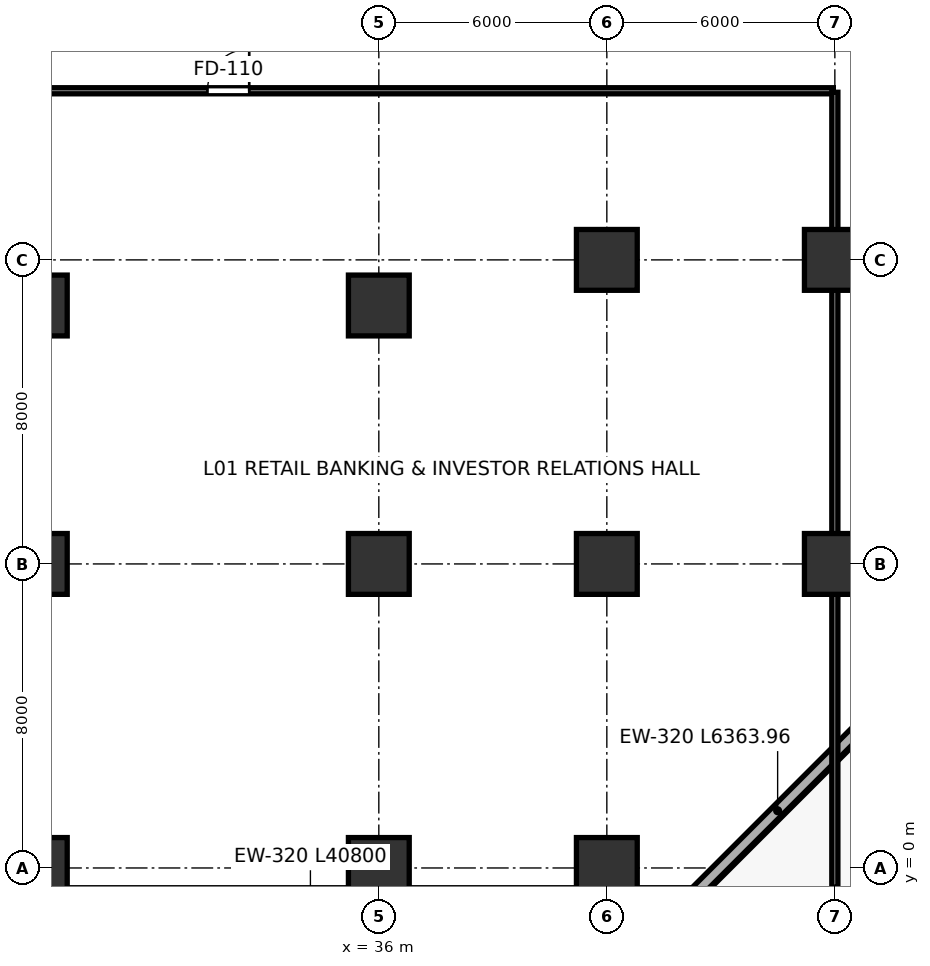
"""IFC4 building model, lengths in metres.
Left out: names, types, materials, properties, quantities, classifications, styles, units other than length and angle.
Written with IfcOpenShell. Run it as: python <this file> out.ifc"""

import sys

from ifc_helpers import new_model, si_unit, direction, frame, frame_2d, origin, origin_2d, place, context, subcontext, project, spatial, rectangle, extrude, source, transform, mapped, element, fill, save


model = new_model("IFC4")
c1 = context("Model", 3, precision=1e-05, world=origin(), true_north=direction((0.0, 1.0)))
c2 = subcontext(c1, "Body", "Model", "MODEL_VIEW")
j1 = project(units=[si_unit("LENGTHUNIT", "METRE"), si_unit("PLANEANGLEUNIT", "RADIAN")], contexts=[c1])
p1 = place(None, origin())
s1 = spatial("IfcSite", under=j1, at=p1, CompositionType="ELEMENT")
p2 = place(p1, origin())
s2 = spatial("IfcBuilding", under=s1, at=p2, CompositionType="ELEMENT")
p3 = place(p2, origin())
s3 = spatial("IfcBuildingStorey", under=s2, at=p3, CompositionType="ELEMENT", Elevation=0.0)
m1 = source(origin(), c2, "Body", "SweptSolid", [
    extrude(rectangle(XDim=1.6, YDim=1.6, at=origin_2d()), origin(), (0.0, 0.0, 1.0), 5.999),
])
p4 = place(p3, frame((27.0, 0.0, 0.001), z_axis=(0.0, 0.0, 1.0), x_axis=(1.0, 0.0, 0.0)))
e1 = element("IfcColumn", 1, at=p4, inside=s3, PredefinedType="COLUMN", context=c2, shape_type="MappedRepresentation", body=[
    mapped(m1, transform((0.0, 0.0, 0.0), scale=1.0)),
])
m2 = source(origin(), c2, "Body", "SweptSolid", [
    extrude(rectangle(XDim=1.6, YDim=1.6, at=origin_2d()), origin(), (0.0, 0.0, 1.0), 5.999),
])
for number, where, z_axis, x_axis in (
    (2, (27.0, 8.0, 0.001), (0.0, 0.0, 1.0), (1.0, 0.0, 0.0)),
    (3, (27.0, 14.8, 0.001), (0.0, 0.0, 1.0), (1.0, 0.0, 0.0)),
):
    element("IfcColumn", number, at=place(p3, frame(where, z_axis=z_axis, x_axis=x_axis)), inside=s3, PredefinedType="COLUMN", context=c2, shape_type="MappedRepresentation", body=[
        mapped(m2, transform((0.0, 0.0, 0.0), scale=1.0)),
    ])
p5 = place(p3, frame((36.0, 0.0, 0.001), z_axis=(0.0, 0.0, 1.0), x_axis=(1.0, 0.0, 0.0)))
e4 = element("IfcColumn", 4, at=p5, inside=s3, PredefinedType="COLUMN", context=c2, shape_type="MappedRepresentation", body=[
    mapped(m1, transform((0.0, 0.0, 0.0), scale=1.0)),
])
for number, where, z_axis, x_axis in (
    (5, (36.0, 8.0, 0.001), (0.0, 0.0, 1.0), (1.0, 0.0, 0.0)),
    (6, (36.0, 14.8, 0.001), (0.0, 0.0, 1.0), (1.0, 0.0, 0.0)),
):
    element("IfcColumn", number, at=place(p3, frame(where, z_axis=z_axis, x_axis=x_axis)), inside=s3, PredefinedType="COLUMN", context=c2, shape_type="MappedRepresentation", body=[
        mapped(m2, transform((0.0, 0.0, 0.0), scale=1.0)),
    ])
p6 = place(p3, frame((42.0, 0.0, 0.001), z_axis=(0.0, 0.0, 1.0), x_axis=(1.0, 0.0, 0.0)))
e7 = element("IfcColumn", 7, at=p6, inside=s3, PredefinedType="COLUMN", context=c2, shape_type="MappedRepresentation", body=[
    mapped(m1, transform((0.0, 0.0, 0.0), scale=1.0)),
])
for number, where, z_axis, x_axis in (
    (8, (42.0, 8.0, 0.001), (0.0, 0.0, 1.0), (1.0, 0.0, 0.0)),
    (9, (42.0, 16.0, 0.001), (0.0, 0.0, 1.0), (1.0, 0.0, 0.0)),
):
    element("IfcColumn", number, at=place(p3, frame(where, z_axis=z_axis, x_axis=x_axis)), inside=s3, PredefinedType="COLUMN", context=c2, shape_type="MappedRepresentation", body=[
        mapped(m2, transform((0.0, 0.0, 0.0), scale=1.0)),
    ])
for number, where, z_axis, x_axis in (
    (10, (48.0, 8.0, 0.001), (0.0, 0.0, 1.0), (1.0, 0.0, 0.0)),
    (11, (48.0, 16.0, 0.001), (0.0, 0.0, 1.0), (1.0, 0.0, 0.0)),
):
    element("IfcColumn", number, at=place(p3, frame(where, z_axis=z_axis, x_axis=x_axis)), inside=s3, PredefinedType="COLUMN", context=c2, shape_type="MappedRepresentation", body=[
        mapped(m1, transform((0.0, 0.0, 0.0), scale=1.0)),
    ])
p7 = place(p3, frame((44.244, -0.744, 0.0), z_axis=(0.0, 0.0, 1.0), x_axis=(0.707106781187, 0.707106781187, 0.0)))
e12 = element("IfcWall", 12, at=p7, inside=s3, PredefinedType="SOLIDWALL", context=c2, shape_type="SweptSolid", body=[
    extrude(rectangle(XDim=6.364, YDim=0.32, at=frame_2d((3.182, 0.0))), origin(), (0.0, 0.0, 1.0), 5.74),
])
p8 = place(p3, frame((20.89, 20.45, 0.0), z_axis=(0.0, 0.0, 1.0), x_axis=(1.0, 0.0, 0.0)))
e13 = element("IfcWall", 13, at=p8, inside=s3, PredefinedType="PARTITIONING", context=c2, shape_type="SweptSolid", body=[
    extrude(rectangle(XDim=27.07, YDim=0.16, at=frame_2d((13.535, 0.0))), origin(), (0.0, 0.0, 1.0), 4.869),
])
p9 = place(p8, frame((10.6, 0.0, 0.0)))
e14 = element("IfcOpeningElement", 14, at=p9, cuts=e13, PredefinedType="OPENING", context=c2, shape_type="SweptSolid", body=[
    extrude(rectangle(XDim=1.1, YDim=2.2, at=frame_2d((0.55, 1.1))), frame((0.0, 0.09, 0.0), z_axis=(0.0, -1.0, 0.0), x_axis=(1.0, 0.0, 0.0)), (0.0, 0.0, 1.0), 0.18),
])
p10 = place(p3, frame((48.0, -0.51, 0.0), z_axis=(0.0, 0.0, 1.0), x_axis=(0.0, 1.0, 0.0)))
e15 = element("IfcWall", 15, at=p10, inside=s3, PredefinedType="PARTITIONING", context=c2, shape_type="SweptSolid", body=[
    extrude(rectangle(XDim=20.92, YDim=0.16, at=frame_2d((10.46, 0.0))), origin(), (0.0, 0.0, 1.0), 4.875),
])
m3 = source(origin(), c2, "Body", "SweptSolid", [
    extrude(rectangle(XDim=1.1, YDim=2.2, at=frame_2d((0.55, 1.1))), frame((0.0, 0.025, 0.0), z_axis=(0.0, -1.0, 0.0), x_axis=(1.0, 0.0, 0.0)), (0.0, 0.0, 1.0), 0.05),
])
p11 = place(p9, origin())
e16 = element("IfcDoor", 16, at=p11, inside=s3, OperationType="SINGLE_SWING_RIGHT", PredefinedType="DOOR", context=c2, shape_type="MappedRepresentation", body=[
    mapped(m3, transform((0.0, 0.0, 0.0), scale=1.0)),
])
fill(e14, e16)
save(model, sys.argv[1])
